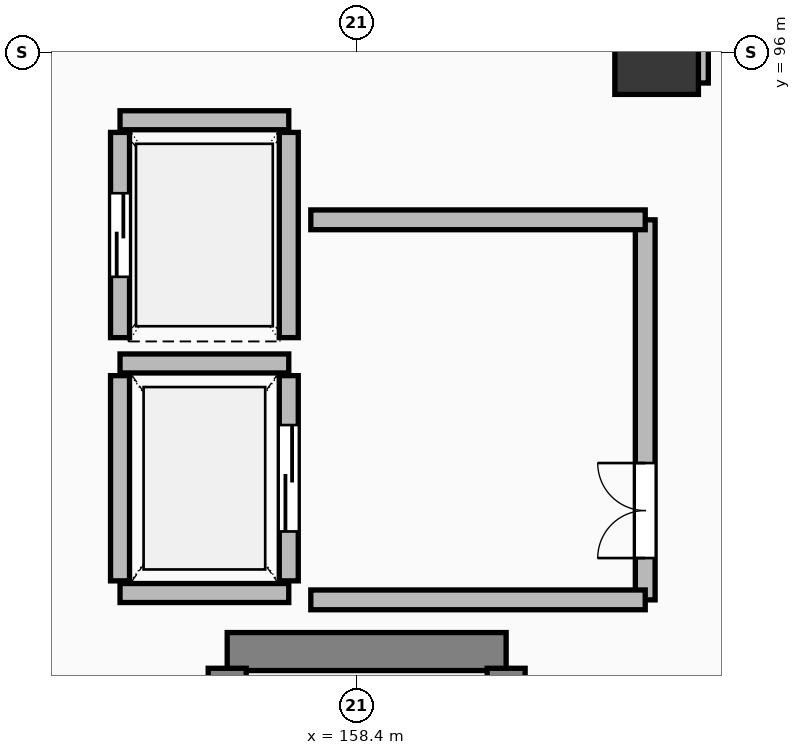
"""IFC4 building model, lengths in metres.
Left out: names, types, materials, properties, quantities, classifications, styles, units other than length and angle.
Written with IfcOpenShell. Run it as: python <this file> out.ifc"""

import sys

from ifc_helpers import new_model, si_unit, direction, frame, frame_2d, origin, origin_2d, place, context, subcontext, project, spatial, rectangle, extrude, element, fill, save


model = new_model("IFC4")
c1 = context("Model", 3, precision=1e-05, world=origin(), true_north=direction((0.0, 1.0)))
c2 = subcontext(c1, "Body", "Model", "MODEL_VIEW")
j1 = project(units=[si_unit("LENGTHUNIT", "METRE"), si_unit("PLANEANGLEUNIT", "RADIAN")], contexts=[c1])
p1 = place(None, origin())
s1 = spatial("IfcSite", under=j1, at=p1, CompositionType="ELEMENT")
p2 = place(p1, origin())
s2 = spatial("IfcBuilding", under=s1, at=p2, CompositionType="ELEMENT")
p3 = place(p2, frame((0.0, 0.0, -4.2)))
s3 = spatial("IfcBuildingStorey", under=s2, at=p3, CompositionType="ELEMENT", Elevation=-4.2)
p4 = place(p3, frame((162.35, 96.0, 0.0), z_axis=(0.0, 0.0, 1.0), x_axis=(1.0, 0.0, 0.0)))
e1 = element("IfcColumn", 1, at=p4, inside=s3, PredefinedType="COLUMN", context=c2, shape_type="SweptSolid", body=[
    extrude(rectangle(XDim=1.1, YDim=1.1, at=origin_2d()), origin(), (0.0, 0.0, 1.0), 4.2),
])
p5 = place(p3, frame((156.7, 88.12, 0.0), z_axis=(0.0, 0.0, 1.0), x_axis=(1.0, 0.0, 0.0)))
e2 = element("IfcWall", 2, at=p5, inside=s3, PredefinedType="SHEAR", context=c2, shape_type="SweptSolid", body=[
    extrude(rectangle(XDim=3.67, YDim=0.5, at=frame_2d((1.835, 0.0))), origin(), (0.0, 0.0, 1.0), 3.78),
])
p6 = place(p3, frame((156.7, 77.4, 0.0), z_axis=(0.0, 0.0, 1.0), x_axis=(0.0, 1.0, 0.0)))
e3 = element("IfcWall", 3, at=p6, inside=s3, PredefinedType="SHEAR", context=c2, shape_type="SweptSolid", body=[
    extrude(rectangle(XDim=10.5, YDim=0.5, at=frame_2d((5.25, 0.0))), origin(), (0.0, 0.0, 1.0), 3.78),
])
p7 = place(p3, frame((160.37, 77.4, 0.0), z_axis=(0.0, 0.0, 1.0), x_axis=(0.0, 1.0, 0.0)))
e4 = element("IfcWall", 4, at=p7, inside=s3, PredefinedType="SHEAR", context=c2, shape_type="SweptSolid", body=[
    extrude(rectangle(XDim=10.5, YDim=0.5, at=frame_2d((5.25, 0.0))), origin(), (0.0, 0.0, 1.0), 3.78),
])
p8 = place(p7, frame((0.45, 0.0, 0.0)))
e5 = element("IfcOpeningElement", 5, at=p8, cuts=e4, PredefinedType="OPENING", context=c2, shape_type="SweptSolid", body=[
    extrude(rectangle(XDim=1.3, YDim=2.15, at=frame_2d((0.65, 1.075))), frame((0.0, 0.262, 0.0), z_axis=(0.0, -1.0, 0.0), x_axis=(1.0, 0.0, 0.0)), (0.0, 0.0, 1.0), 0.524),
])
for number, where, z_axis, x_axis in (
    (6, (155.29, 88.89, 0.0), (0.0, 0.0, 1.0), (1.0, 0.0, 0.0)),
    (7, (155.29, 91.91, 0.0), (0.0, 0.0, 1.0), (1.0, 0.0, 0.0)),
):
    element("IfcWall", number, at=place(p3, frame(where, z_axis=z_axis, x_axis=x_axis)), inside=s3, PredefinedType="SOLIDWALL", context=c2, shape_type="SweptSolid", body=[
        extrude(rectangle(XDim=2.22, YDim=0.25, at=frame_2d((1.11, 0.0))), origin(), (0.0, 0.0, 1.0), 3.78),
    ])
p9 = place(p3, frame((155.29, 89.05, 0.0), z_axis=(0.0, 0.0, 1.0), x_axis=(0.0, 1.0, 0.0)))
e8 = element("IfcWall", 8, at=p9, inside=s3, PredefinedType="SOLIDWALL", context=c2, shape_type="SweptSolid", body=[
    extrude(rectangle(XDim=2.7, YDim=0.25, at=frame_2d((1.35, 0.0))), origin(), (0.0, 0.0, 1.0), 3.78),
])
p10 = place(p3, frame((157.51, 89.05, 0.0), z_axis=(0.0, 0.0, 1.0), x_axis=(0.0, 1.0, 0.0)))
e9 = element("IfcWall", 9, at=p10, inside=s3, PredefinedType="SOLIDWALL", context=c2, shape_type="SweptSolid", body=[
    extrude(rectangle(XDim=2.7, YDim=0.25, at=frame_2d((1.35, 0.0))), origin(), (0.0, 0.0, 1.0), 3.78),
])
p11 = place(p10, frame((0.65, 0.0, 0.0)))
e10 = element("IfcOpeningElement", 10, at=p11, cuts=e9, PredefinedType="OPENING", context=c2, shape_type="SweptSolid", body=[
    extrude(rectangle(XDim=1.4, YDim=2.3, at=frame_2d((0.7, 1.15))), frame((0.0, 0.137, 0.0), z_axis=(0.0, -1.0, 0.0), x_axis=(1.0, 0.0, 0.0)), (0.0, 0.0, 1.0), 0.274),
])
p12 = place(p3, frame((155.29, 95.11, 0.0), z_axis=(0.0, 0.0, 1.0), x_axis=(1.0, 0.0, 0.0)))
e11 = element("IfcWall", 11, at=p12, inside=s3, PredefinedType="SOLIDWALL", context=c2, shape_type="SweptSolid", body=[
    extrude(rectangle(XDim=2.22, YDim=0.25, at=frame_2d((1.11, 0.0))), origin(), (0.0, 0.0, 1.0), 3.78),
])
p13 = place(p3, frame((155.29, 92.25, 0.0), z_axis=(0.0, 0.0, 1.0), x_axis=(0.0, 1.0, 0.0)))
e12 = element("IfcWall", 12, at=p13, inside=s3, PredefinedType="SOLIDWALL", context=c2, shape_type="SweptSolid", body=[
    extrude(rectangle(XDim=2.7, YDim=0.25, at=frame_2d((1.35, 0.0))), origin(), (0.0, 0.0, 1.0), 3.78),
])
p14 = place(p13, frame((0.8, 0.0, 0.0)))
e13 = element("IfcOpeningElement", 13, at=p14, cuts=e12, PredefinedType="OPENING", context=c2, shape_type="SweptSolid", body=[
    extrude(rectangle(XDim=1.1, YDim=2.2, at=frame_2d((0.55, 1.1))), frame((0.0, 0.137, 0.0), z_axis=(0.0, -1.0, 0.0), x_axis=(1.0, 0.0, 0.0)), (0.0, 0.0, 1.0), 0.274),
])
p15 = place(p3, frame((157.51, 92.25, 0.0), z_axis=(0.0, 0.0, 1.0), x_axis=(0.0, 1.0, 0.0)))
e14 = element("IfcWall", 14, at=p15, inside=s3, PredefinedType="SOLIDWALL", context=c2, shape_type="SweptSolid", body=[
    extrude(rectangle(XDim=2.7, YDim=0.25, at=frame_2d((1.35, 0.0))), origin(), (0.0, 0.0, 1.0), 3.78),
])
p16 = place(p3, frame((162.2, 88.8, 0.0), z_axis=(0.0, 0.0, 1.0), x_axis=(0.0, 1.0, 0.0)))
e15 = element("IfcWall", 15, at=p16, inside=s3, PredefinedType="SOLIDWALL", context=c2, shape_type="SweptSolid", body=[
    extrude(rectangle(XDim=5.0, YDim=0.26, at=frame_2d((2.5, 0.0))), origin(), (0.0, 0.0, 1.0), 2.932),
])
p17 = place(p16, frame((0.55, 0.0, 0.0)))
e16 = element("IfcOpeningElement", 16, at=p17, cuts=e15, PredefinedType="OPENING", context=c2, shape_type="SweptSolid", body=[
    extrude(rectangle(XDim=1.25, YDim=2.15, at=frame_2d((0.625, 1.075))), frame((0.0, 0.142, 0.0), z_axis=(0.0, -1.0, 0.0), x_axis=(1.0, 0.0, 0.0)), (0.0, 0.0, 1.0), 0.284),
])
for number, where, z_axis, x_axis in (
    (17, (157.8, 88.8, 0.0), (0.0, 0.0, 1.0), (1.0, 0.0, 0.0)),
    (18, (157.8, 93.8, 0.0), (0.0, 0.0, 1.0), (1.0, 0.0, 0.0)),
):
    element("IfcWall", number, at=place(p3, frame(where, z_axis=z_axis, x_axis=x_axis)), inside=s3, PredefinedType="SOLIDWALL", context=c2, shape_type="SweptSolid", body=[
        extrude(rectangle(XDim=4.4, YDim=0.26, at=frame_2d((2.2, 0.0))), origin(), (0.0, 0.0, 1.0), 2.932),
    ])
p18 = place(p3, frame((162.92, 95.6, 0.0), z_axis=(0.0, 0.0, 1.0), x_axis=(0.0, 1.0, 0.0)))
e19 = element("IfcWall", 19, at=p18, inside=s3, PredefinedType="PARTITIONING", context=c2, shape_type="SweptSolid", body=[
    extrude(rectangle(XDim=7.0, YDim=0.22, at=frame_2d((3.5, 0.0))), origin(), (0.0, 0.0, 1.0), 2.932),
])
p19 = place(p11, origin())
e20 = element("IfcDoor", 20, at=p19, inside=s3, OperationType="SLIDING_TO_LEFT", PredefinedType="DOOR", context=c2, shape_type="SweptSolid", body=[
    extrude(rectangle(XDim=1.4, YDim=2.3, at=frame_2d((0.7, 1.15))), frame((0.0, 0.025, 0.0), z_axis=(0.0, -1.0, 0.0), x_axis=(1.0, 0.0, 0.0)), (0.0, 0.0, 1.0), 0.05),
])
fill(e10, e20)
p20 = place(p14, origin())
e21 = element("IfcDoor", 21, at=p20, inside=s3, OperationType="SLIDING_TO_LEFT", PredefinedType="DOOR", context=c2, shape_type="SweptSolid", body=[
    extrude(rectangle(XDim=1.1, YDim=2.2, at=frame_2d((0.55, 1.1))), frame((0.0, 0.025, 0.0), z_axis=(0.0, -1.0, 0.0), x_axis=(1.0, 0.0, 0.0)), (0.0, 0.0, 1.0), 0.05),
])
fill(e13, e21)
p21 = place(p17, origin())
e22 = element("IfcDoor", 22, at=p21, inside=s3, OperationType="DOUBLE_DOOR_SINGLE_SWING", PredefinedType="DOOR", context=c2, shape_type="SweptSolid", body=[
    extrude(rectangle(XDim=1.25, YDim=2.15, at=frame_2d((0.625, 1.075))), frame((0.0, 0.025, 0.0), z_axis=(0.0, -1.0, 0.0), x_axis=(1.0, 0.0, 0.0)), (0.0, 0.0, 1.0), 0.05),
])
fill(e16, e22)
save(model, sys.argv[1])
